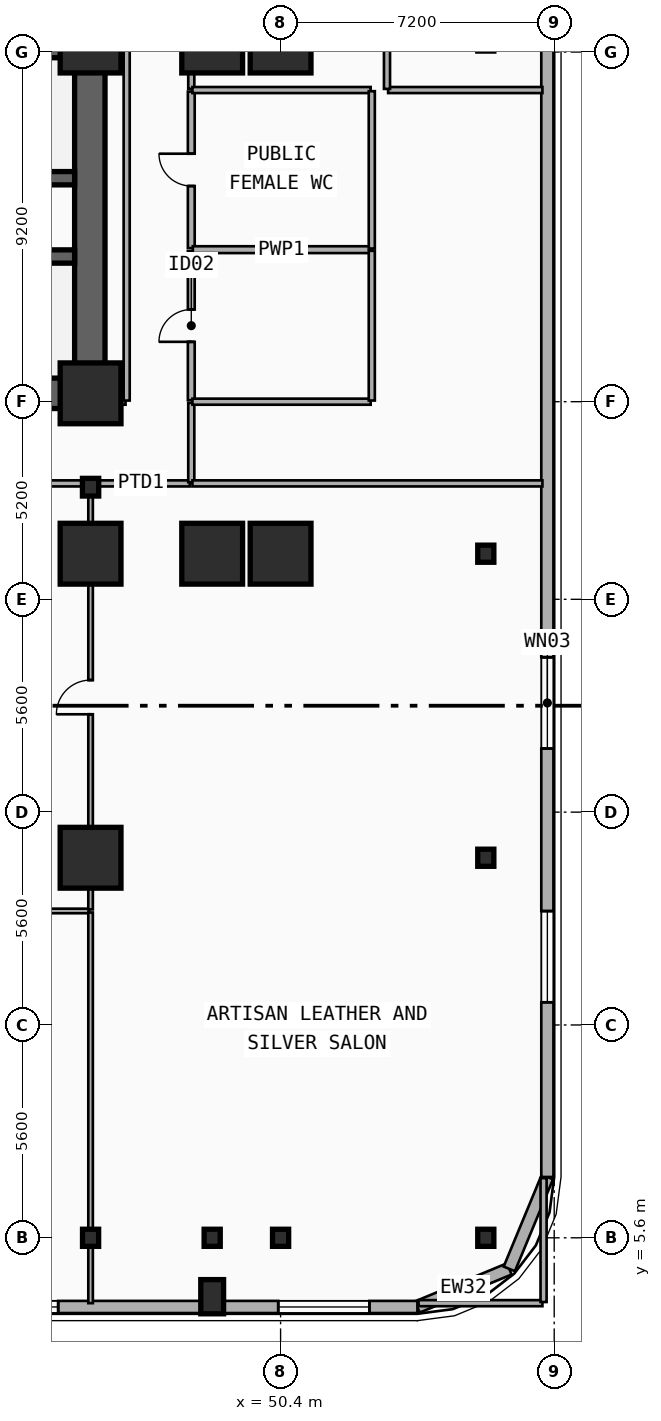
"""IFC4 building model, lengths in metres.
Left out: names, types, materials, properties, quantities, classifications, styles, units other than length and angle.
Written with IfcOpenShell. Run it as: python <this file> out.ifc"""

import sys

from ifc_helpers import new_model, si_unit, direction, frame, frame_2d, origin, origin_2d, place, context, subcontext, project, spatial, rectangle, i_section, extrude, element, fill, save


model = new_model("IFC4")
c1 = context("Model", 3, precision=1e-05, world=origin(), true_north=direction((0.0, 1.0)))
c2 = subcontext(c1, "Body", "Model", "MODEL_VIEW")
j1 = project(units=[si_unit("LENGTHUNIT", "METRE"), si_unit("PLANEANGLEUNIT", "RADIAN")], contexts=[c1])
p1 = place(None, origin())
s1 = spatial("IfcSite", under=j1, at=p1, CompositionType="ELEMENT")
p2 = place(p1, origin())
s2 = spatial("IfcBuilding", under=s1, at=p2, CompositionType="ELEMENT")
p3 = place(p2, frame((0.0, 0.0, 5.4)))
s3 = spatial("IfcBuildingStorey", under=s2, at=p3, CompositionType="ELEMENT", Elevation=5.4)
p4 = place(p3, frame((12.15, 37.05, 0.0), z_axis=(0.0, 0.0, 1.0), x_axis=(1.0, 0.0, 0.0)))
e1 = element("IfcWall", 1, at=p4, inside=s3, PredefinedType="SHEAR", context=c2, shape_type="SweptSolid", body=[
    extrude(rectangle(XDim=33.23, YDim=0.8, at=frame_2d((16.615, 0.0))), origin(), (0.0, 0.0, 1.0), 5.0),
])
p5 = place(p3, frame((45.38, 27.82, 0.0), z_axis=(0.0, 0.0, 1.0), x_axis=(-1.0, 0.0, 0.0)))
e2 = element("IfcWall", 2, at=p5, inside=s3, PredefinedType="SHEAR", context=c2, shape_type="SweptSolid", body=[
    extrude(rectangle(XDim=12.23, YDim=0.8, at=frame_2d((6.115, 0.0))), origin(), (0.0, 0.0, 1.0), 5.0),
])
p6 = place(p5, frame((9.93, 0.0, 0.0)))
e3 = element("IfcOpeningElement", 3, at=p6, cuts=e2, PredefinedType="OPENING", context=c2, shape_type="SweptSolid", body=[
    extrude(rectangle(XDim=1.1, YDim=2.15, at=frame_2d((0.55, 1.075))), frame((0.0, 0.41, 0.0), z_axis=(0.0, -1.0, 0.0), x_axis=(1.0, 0.0, 0.0)), (0.0, 0.0, 1.0), 0.82),
])
p7 = place(p5, frame((6.23, 0.0, 0.0)))
e4 = element("IfcOpeningElement", 4, at=p7, cuts=e2, PredefinedType="OPENING", context=c2, shape_type="SweptSolid", body=[
    extrude(rectangle(XDim=1.1, YDim=2.15, at=frame_2d((0.55, 1.075))), frame((0.0, 0.41, 0.0), z_axis=(0.0, -1.0, 0.0), x_axis=(1.0, 0.0, 0.0)), (0.0, 0.0, 1.0), 0.82),
])
p8 = place(p3, frame((45.38, 28.22, 0.0), z_axis=(0.0, 0.0, 1.0), x_axis=(0.0, 1.0, 0.0)))
e5 = element("IfcWall", 5, at=p8, inside=s3, PredefinedType="SHEAR", context=c2, shape_type="SweptSolid", body=[
    extrude(rectangle(XDim=8.43, YDim=0.8, at=frame_2d((4.215, 0.0))), origin(), (0.0, 0.0, 1.0), 5.0),
])
p9 = place(p3, frame((44.98, 33.48, 0.0), z_axis=(0.0, 0.0, 1.0), x_axis=(-1.0, 0.0, 0.0)))
e6 = element("IfcWall", 6, at=p9, inside=s3, PredefinedType="SHEAR", context=c2, shape_type="SweptSolid", body=[
    extrude(rectangle(XDim=8.425, YDim=0.35, at=frame_2d((4.212, 0.0))), origin(), (0.0, 0.0, 1.0), 5.0),
])
p10 = place(p9, frame((7.08, 0.0, 0.0)))
e7 = element("IfcOpeningElement", 7, at=p10, cuts=e6, PredefinedType="OPENING", context=c2, shape_type="SweptSolid", body=[
    extrude(rectangle(XDim=1.1, YDim=2.15, at=frame_2d((0.55, 1.075))), frame((0.0, 0.185, 0.0), z_axis=(0.0, -1.0, 0.0), x_axis=(1.0, 0.0, 0.0)), (0.0, 0.0, 1.0), 0.37),
])
p11 = place(p3, frame((36.555, 31.42, 0.0), z_axis=(0.0, 0.0, 1.0), x_axis=(1.0, 0.0, 0.0)))
e8 = element("IfcWall", 8, at=p11, inside=s3, PredefinedType="SHEAR", context=c2, shape_type="SweptSolid", body=[
    extrude(rectangle(XDim=8.425, YDim=0.35, at=frame_2d((4.212, 0.0))), origin(), (0.0, 0.0, 1.0), 5.0),
])
for number, where, z_axis, x_axis in (
    (9, (45.4, 27.82, 0.0), (0.0, 0.0, 1.0), (1.0, 0.0, 0.0)),
    (10, (45.4, 37.05, 0.0), (0.0, 0.0, 1.0), (1.0, 0.0, 0.0)),
):
    element("IfcColumn", number, at=place(p3, frame(where, z_axis=z_axis, x_axis=x_axis)), inside=s3, PredefinedType="COLUMN", context=c2, shape_type="SweptSolid", body=[
        extrude(rectangle(XDim=1.6, YDim=1.6, at=origin_2d()), origin(), (0.0, 0.0, 1.0), 5.0),
    ])
p12 = place(p3, frame((45.4, 25.35, 0.0), z_axis=(0.0, 0.0, 1.0), x_axis=(1.0, 0.0, 0.0)))
e11 = element("IfcColumn", 11, at=p12, inside=s3, PredefinedType="COLUMN", context=c2, shape_type="SweptSolid", body=[
    extrude(i_section(OverallWidth=0.428, OverallDepth=0.465, WebThickness=0.045, FlangeThickness=0.073, FilletRadius=0.015, at=origin_2d()), origin(), (0.0, 0.0, 1.0), 5.0),
])
p13 = place(p3, frame((45.4, 5.6, 0.0), z_axis=(0.0, 0.0, 1.0), x_axis=(1.0, 0.0, 0.0)))
e12 = element("IfcColumn", 12, at=p13, inside=s3, PredefinedType="COLUMN", context=c2, shape_type="SweptSolid", body=[
    extrude(i_section(OverallWidth=0.424, OverallDepth=0.45, WebThickness=0.041, FlangeThickness=0.065, FilletRadius=0.015, at=origin_2d()), origin(), (0.0, 0.0, 1.0), 5.0),
])
for number, where, z_axis, x_axis in (
    (13, (45.4, 15.6, 0.0), (0.0, 0.0, 1.0), (1.0, 0.0, 0.0)),
    (14, (45.4, 23.6, 0.0), (0.0, 0.0, 1.0), (1.0, 0.0, 0.0)),
):
    element("IfcColumn", number, at=place(p3, frame(where, z_axis=z_axis, x_axis=x_axis)), inside=s3, PredefinedType="COLUMN", context=c2, shape_type="SweptSolid", body=[
        extrude(rectangle(XDim=1.6, YDim=1.6, at=origin_2d()), origin(), (0.0, 0.0, 1.0), 5.0),
    ])
p14 = place(p3, frame((48.6, 5.6, 0.0), z_axis=(0.0, 0.0, 1.0), x_axis=(1.0, 0.0, 0.0)))
e15 = element("IfcColumn", 15, at=p14, inside=s3, PredefinedType="COLUMN", context=c2, shape_type="SweptSolid", body=[
    extrude(i_section(OverallWidth=0.424, OverallDepth=0.45, WebThickness=0.041, FlangeThickness=0.065, FilletRadius=0.015, at=origin_2d()), origin(), (0.0, 0.0, 1.0), 5.0),
])
for number, where, z_axis, x_axis in (
    (16, (48.6, 23.6, 0.0), (0.0, 0.0, 1.0), (1.0, 0.0, 0.0)),
    (17, (48.6, 37.05, 0.0), (0.0, 0.0, 1.0), (1.0, 0.0, 0.0)),
):
    element("IfcColumn", number, at=place(p3, frame(where, z_axis=z_axis, x_axis=x_axis)), inside=s3, PredefinedType="COLUMN", context=c2, shape_type="SweptSolid", body=[
        extrude(rectangle(XDim=1.6, YDim=1.6, at=origin_2d()), origin(), (0.0, 0.0, 1.0), 5.0),
    ])
p15 = place(p3, frame((50.4, 5.6, 0.0), z_axis=(0.0, 0.0, 1.0), x_axis=(1.0, 0.0, 0.0)))
e18 = element("IfcColumn", 18, at=p15, inside=s3, PredefinedType="COLUMN", context=c2, shape_type="SweptSolid", body=[
    extrude(i_section(OverallWidth=0.424, OverallDepth=0.45, WebThickness=0.041, FlangeThickness=0.065, FilletRadius=0.015, at=origin_2d()), origin(), (0.0, 0.0, 1.0), 5.0),
])
for number, where, z_axis, x_axis in (
    (19, (50.4, 23.6, 0.0), (0.0, 0.0, 1.0), (1.0, 0.0, 0.0)),
    (20, (50.4, 37.05, 0.0), (0.0, 0.0, 1.0), (1.0, 0.0, 0.0)),
):
    element("IfcColumn", number, at=place(p3, frame(where, z_axis=z_axis, x_axis=x_axis)), inside=s3, PredefinedType="COLUMN", context=c2, shape_type="SweptSolid", body=[
        extrude(rectangle(XDim=1.6, YDim=1.6, at=origin_2d()), origin(), (0.0, 0.0, 1.0), 5.0),
    ])
for number, where, z_axis, x_axis in (
    (21, (55.8, 5.6, 0.0), (0.0, 0.0, 1.0), (1.0, 0.0, 0.0)),
    (22, (55.8, 15.6, 0.0), (0.0, 0.0, 1.0), (1.0, 0.0, 0.0)),
    (23, (55.8, 23.6, 0.0), (0.0, 0.0, 1.0), (1.0, 0.0, 0.0)),
):
    element("IfcColumn", number, at=place(p3, frame(where, z_axis=z_axis, x_axis=x_axis)), inside=s3, PredefinedType="COLUMN", context=c2, shape_type="SweptSolid", body=[
        extrude(i_section(OverallWidth=0.424, OverallDepth=0.45, WebThickness=0.041, FlangeThickness=0.065, FilletRadius=0.015, at=origin_2d()), origin(), (0.0, 0.0, 1.0), 5.0),
    ])
p16 = place(p3, frame((48.6, 4.05, 0.0), z_axis=(0.0, 0.0, 1.0), x_axis=(1.0, 0.0, 0.0)))
e24 = element("IfcColumn", 24, at=p16, inside=s3, PredefinedType="PILASTER", context=c2, shape_type="SweptSolid", body=[
    extrude(rectangle(XDim=0.6, YDim=0.9, at=origin_2d()), origin(), (0.0, 0.0, 1.0), 5.0),
])
for number, where, z_axis, x_axis in (
    (25, (56.418, 4.782, 0.0), (0.0, 0.0, 1.0), (-0.924, -0.383, 0.0)),
    (26, (57.42, 7.2, 0.0), (0.0, 0.0, 1.0), (-0.383, -0.924, 0.0)),
):
    element("IfcWall", number, at=place(p3, frame(where, z_axis=z_axis, x_axis=x_axis)), inside=s3, PredefinedType="SOLIDWALL", context=c2, shape_type="SweptSolid", body=[
        extrude(rectangle(XDim=2.617, YDim=0.32, at=frame_2d((1.309, 0.0))), origin(), (0.0, 0.0, 1.0), 4.7),
    ])
p17 = place(p3, frame((57.42, 41.6, 0.0), z_axis=(0.0, 0.0, 1.0), x_axis=(0.0, -1.0, 0.0)))
e27 = element("IfcWall", 27, at=p17, inside=s3, PredefinedType="SOLIDWALL", context=c2, shape_type="SweptSolid", body=[
    extrude(rectangle(XDim=34.4, YDim=0.32, at=frame_2d((17.2, 0.0))), origin(), (0.0, 0.0, 1.0), 4.7),
])
p18 = place(p17, frame((20.727, 0.0, 0.9)))
e28 = element("IfcOpeningElement", 28, at=p18, cuts=e27, PredefinedType="OPENING", context=c2, shape_type="SweptSolid", body=[
    extrude(rectangle(XDim=2.4, YDim=1.8, at=frame_2d((1.2, 0.9))), frame((0.0, 0.17, 0.0), z_axis=(0.0, -1.0, 0.0), x_axis=(1.0, 0.0, 0.0)), (0.0, 0.0, 1.0), 0.34),
])
p19 = place(p17, frame((27.403, 0.0, 0.9)))
e29 = element("IfcOpeningElement", 29, at=p19, cuts=e27, PredefinedType="OPENING", context=c2, shape_type="SweptSolid", body=[
    extrude(rectangle(XDim=2.4, YDim=1.8, at=frame_2d((1.2, 0.9))), frame((0.0, 0.17, 0.0), z_axis=(0.0, -1.0, 0.0), x_axis=(1.0, 0.0, 0.0)), (0.0, 0.0, 1.0), 0.34),
])
p20 = place(p3, frame((54.0, 3.78, 0.0), z_axis=(0.0, 0.0, 1.0), x_axis=(-1.0, 0.0, 0.0)))
e30 = element("IfcWall", 30, at=p20, inside=s3, PredefinedType="SOLIDWALL", context=c2, shape_type="SweptSolid", body=[
    extrude(rectangle(XDim=16.95, YDim=0.32, at=frame_2d((8.475, 0.0))), origin(), (0.0, 0.0, 1.0), 4.03),
])
p21 = place(p20, frame((9.452, 0.0, 0.9)))
e31 = element("IfcOpeningElement", 31, at=p21, cuts=e30, PredefinedType="OPENING", context=c2, shape_type="SweptSolid", body=[
    extrude(rectangle(XDim=2.4, YDim=1.8, at=frame_2d((1.2, 0.9))), frame((0.0, 0.17, 0.0), z_axis=(0.0, -1.0, 0.0), x_axis=(1.0, 0.0, 0.0)), (0.0, 0.0, 1.0), 0.34),
])
p22 = place(p20, frame((1.262, 0.0, 0.9)))
e32 = element("IfcOpeningElement", 32, at=p22, cuts=e30, PredefinedType="OPENING", context=c2, shape_type="SweptSolid", body=[
    extrude(rectangle(XDim=2.4, YDim=1.8, at=frame_2d((1.2, 0.9))), frame((0.0, 0.17, 0.0), z_axis=(0.0, -1.0, 0.0), x_axis=(1.0, 0.0, 0.0)), (0.0, 0.0, 1.0), 0.34),
])
p23 = place(p3, frame((36.39, 25.45, 0.0), z_axis=(0.0, 0.0, 1.0), x_axis=(1.0, 0.0, 0.0)))
e33 = element("IfcWall", 33, at=p23, inside=s3, PredefinedType="PARTITIONING", context=c2, shape_type="SweptSolid", body=[
    extrude(rectangle(XDim=8.97, YDim=0.16, at=frame_2d((4.485, 0.0))), origin(), (0.0, 0.0, 1.0), 3.672),
])
p24 = place(p23, frame((3.985, 0.0, 0.0)))
e34 = element("IfcOpeningElement", 34, at=p24, cuts=e33, PredefinedType="OPENING", context=c2, shape_type="SweptSolid", body=[
    extrude(rectangle(XDim=1.0, YDim=2.15, at=frame_2d((0.5, 1.075))), frame((0.0, 0.09, 0.0), z_axis=(0.0, -1.0, 0.0), x_axis=(1.0, 0.0, 0.0)), (0.0, 0.0, 1.0), 0.18),
])
p25 = place(p3, frame((45.44, 25.45, 0.0), z_axis=(0.0, 0.0, 1.0), x_axis=(1.0, 0.0, 0.0)))
e35 = element("IfcWall", 35, at=p25, inside=s3, PredefinedType="PARTITIONING", context=c2, shape_type="SweptSolid", body=[
    extrude(rectangle(XDim=2.57, YDim=0.16, at=frame_2d((1.285, 0.0))), origin(), (0.0, 0.0, 1.0), 3.672),
])
p26 = place(p3, frame((48.05, 27.64, 0.0), z_axis=(0.0, 0.0, 1.0), x_axis=(0.0, 1.0, 0.0)))
e36 = element("IfcWall", 36, at=p26, inside=s3, PredefinedType="PLUMBINGWALL", context=c2, shape_type="SweptSolid", body=[
    extrude(rectangle(XDim=3.92, YDim=0.18, at=frame_2d((1.96, 0.0))), origin(), (0.0, 0.0, 1.0), 4.7),
])
p27 = place(p26, frame((1.535, 0.0, 0.0)))
e37 = element("IfcOpeningElement", 37, at=p27, cuts=e36, PredefinedType="OPENING", context=c2, shape_type="SweptSolid", body=[
    extrude(rectangle(XDim=0.85, YDim=2.1, at=frame_2d((0.425, 1.05))), frame((0.0, 0.1, 0.0), z_axis=(0.0, -1.0, 0.0), x_axis=(1.0, 0.0, 0.0)), (0.0, 0.0, 1.0), 0.2),
])
p28 = place(p3, frame((48.05, 31.64, 0.0), z_axis=(0.0, 0.0, 1.0), x_axis=(0.0, 1.0, 0.0)))
e38 = element("IfcWall", 38, at=p28, inside=s3, PredefinedType="PLUMBINGWALL", context=c2, shape_type="SweptSolid", body=[
    extrude(rectangle(XDim=4.12, YDim=0.18, at=frame_2d((2.06, 0.0))), origin(), (0.0, 0.0, 1.0), 4.7),
])
p29 = place(p28, frame((1.635, 0.0, 0.0)))
e39 = element("IfcOpeningElement", 39, at=p29, cuts=e38, PredefinedType="OPENING", context=c2, shape_type="SweptSolid", body=[
    extrude(rectangle(XDim=0.85, YDim=2.1, at=frame_2d((0.425, 1.05))), frame((0.0, 0.1, 0.0), z_axis=(0.0, -1.0, 0.0), x_axis=(1.0, 0.0, 0.0)), (0.0, 0.0, 1.0), 0.2),
])
p30 = place(p3, frame((48.09, 31.6, 0.0), z_axis=(0.0, 0.0, 1.0), x_axis=(1.0, 0.0, 0.0)))
e40 = element("IfcWall", 40, at=p30, inside=s3, PredefinedType="PLUMBINGWALL", context=c2, shape_type="SweptSolid", body=[
    extrude(rectangle(XDim=4.67, YDim=0.18, at=frame_2d((2.335, 0.0))), origin(), (0.0, 0.0, 1.0), 4.7),
])
p31 = place(p3, frame((36.39, 14.2, 0.0), z_axis=(0.0, 0.0, 1.0), x_axis=(1.0, 0.0, 0.0)))
e41 = element("IfcWall", 41, at=p31, inside=s3, PredefinedType="PARTITIONING", context=c2, shape_type="SweptSolid", body=[
    extrude(rectangle(XDim=8.97, YDim=0.12, at=frame_2d((4.485, 0.0))), origin(), (0.0, 0.0, 1.0), 3.672),
])
p32 = place(p31, frame((4.035, 0.0, 0.0)))
e42 = element("IfcOpeningElement", 42, at=p32, cuts=e41, PredefinedType="OPENING", context=c2, shape_type="SweptSolid", body=[
    extrude(rectangle(XDim=0.9, YDim=2.1, at=frame_2d((0.45, 1.05))), frame((0.0, 0.07, 0.0), z_axis=(0.0, -1.0, 0.0), x_axis=(1.0, 0.0, 0.0)), (0.0, 0.0, 1.0), 0.14),
])
p33 = place(p3, frame((45.4, 3.88, 0.0), z_axis=(0.0, 0.0, 1.0), x_axis=(0.0, 1.0, 0.0)))
e43 = element("IfcWall", 43, at=p33, inside=s3, PredefinedType="PARTITIONING", context=c2, shape_type="SweptSolid", body=[
    extrude(rectangle(XDim=10.28, YDim=0.12, at=frame_2d((5.14, 0.0))), origin(), (0.0, 0.0, 1.0), 3.672),
])
p34 = place(p3, frame((45.4, 14.24, 0.0), z_axis=(0.0, 0.0, 1.0), x_axis=(0.0, 1.0, 0.0)))
e44 = element("IfcWall", 44, at=p34, inside=s3, PredefinedType="PARTITIONING", context=c2, shape_type="SweptSolid", body=[
    extrude(rectangle(XDim=11.17, YDim=0.12, at=frame_2d((5.585, 0.0))), origin(), (0.0, 0.0, 1.0), 3.672),
])
p35 = place(p34, frame((5.135, 0.0, 0.0)))
e45 = element("IfcOpeningElement", 45, at=p35, cuts=e44, PredefinedType="OPENING", context=c2, shape_type="SweptSolid", body=[
    extrude(rectangle(XDim=0.9, YDim=2.1, at=frame_2d((0.45, 1.05))), frame((0.0, 0.07, 0.0), z_axis=(0.0, -1.0, 0.0), x_axis=(1.0, 0.0, 0.0)), (0.0, 0.0, 1.0), 0.14),
])
p36 = place(p3, frame((45.41, 27.6, 0.0), z_axis=(0.0, 0.0, 1.0), x_axis=(1.0, 0.0, 0.0)))
e46 = element("IfcWall", 46, at=p36, inside=s3, PredefinedType="PARTITIONING", context=c2, shape_type="SweptSolid", body=[
    extrude(rectangle(XDim=0.91, YDim=0.16, at=frame_2d((0.455, 0.0))), origin(), (0.0, 0.0, 1.0), 3.672),
])
p37 = place(p3, frame((48.05, 25.48, 0.0), z_axis=(0.0, 0.0, 1.0), x_axis=(0.0, 1.0, 0.0)))
e47 = element("IfcWall", 47, at=p37, inside=s3, PredefinedType="PARTITIONING", context=c2, shape_type="SweptSolid", body=[
    extrude(rectangle(XDim=2.09, YDim=0.16, at=frame_2d((1.045, 0.0))), origin(), (0.0, 0.0, 1.0), 4.7),
])
p38 = place(p3, frame((46.35, 27.63, 0.0), z_axis=(0.0, 0.0, 1.0), x_axis=(0.0, 1.0, 0.0)))
e48 = element("IfcWall", 48, at=p38, inside=s3, PredefinedType="PARTITIONING", context=c2, shape_type="SweptSolid", body=[
    extrude(rectangle(XDim=10.29, YDim=0.16, at=frame_2d((5.145, 0.0))), origin(), (0.0, 0.0, 1.0), 4.7),
])
p39 = place(p3, frame((48.05, 35.83, 0.0), z_axis=(0.0, 0.0, 1.0), x_axis=(0.0, 1.0, 0.0)))
e49 = element("IfcWall", 49, at=p39, inside=s3, PredefinedType="PARTITIONING", context=c2, shape_type="SweptSolid", body=[
    extrude(rectangle(XDim=2.09, YDim=0.16, at=frame_2d((1.045, 0.0))), origin(), (0.0, 0.0, 1.0), 4.7),
])
p40 = place(p3, frame((48.08, 27.6, 0.0), z_axis=(0.0, 0.0, 1.0), x_axis=(1.0, 0.0, 0.0)))
e50 = element("IfcWall", 50, at=p40, inside=s3, PredefinedType="PARTITIONING", context=c2, shape_type="SweptSolid", body=[
    extrude(rectangle(XDim=4.69, YDim=0.16, at=frame_2d((2.345, 0.0))), origin(), (0.0, 0.0, 1.0), 4.7),
])
p41 = place(p3, frame((52.8, 27.63, 0.0), z_axis=(0.0, 0.0, 1.0), x_axis=(0.0, 1.0, 0.0)))
e51 = element("IfcWall", 51, at=p41, inside=s3, PredefinedType="PARTITIONING", context=c2, shape_type="SweptSolid", body=[
    extrude(rectangle(XDim=3.94, YDim=0.16, at=frame_2d((1.97, 0.0))), origin(), (0.0, 0.0, 1.0), 4.7),
])
p42 = place(p3, frame((48.08, 35.8, 0.0), z_axis=(0.0, 0.0, 1.0), x_axis=(1.0, 0.0, 0.0)))
e52 = element("IfcWall", 52, at=p42, inside=s3, PredefinedType="PARTITIONING", context=c2, shape_type="SweptSolid", body=[
    extrude(rectangle(XDim=4.69, YDim=0.16, at=frame_2d((2.345, 0.0))), origin(), (0.0, 0.0, 1.0), 4.7),
])
p43 = place(p3, frame((52.8, 31.63, 0.0), z_axis=(0.0, 0.0, 1.0), x_axis=(0.0, 1.0, 0.0)))
e53 = element("IfcWall", 53, at=p43, inside=s3, PredefinedType="PARTITIONING", context=c2, shape_type="SweptSolid", body=[
    extrude(rectangle(XDim=4.14, YDim=0.16, at=frame_2d((2.07, 0.0))), origin(), (0.0, 0.0, 1.0), 4.7),
])
p44 = place(p3, frame((53.23, 35.8, 0.0), z_axis=(0.0, 0.0, 1.0), x_axis=(1.0, 0.0, 0.0)))
e54 = element("IfcWall", 54, at=p44, inside=s3, PredefinedType="PARTITIONING", context=c2, shape_type="SweptSolid", body=[
    extrude(rectangle(XDim=4.06, YDim=0.16, at=frame_2d((2.03, 0.0))), origin(), (0.0, 0.0, 1.0), 4.7),
])
p45 = place(p3, frame((53.2, 35.83, 0.0), z_axis=(0.0, 0.0, 1.0), x_axis=(0.0, 1.0, 0.0)))
e55 = element("IfcWall", 55, at=p45, inside=s3, PredefinedType="PARTITIONING", context=c2, shape_type="SweptSolid", body=[
    extrude(rectangle(XDim=2.09, YDim=0.16, at=frame_2d((1.045, 0.0))), origin(), (0.0, 0.0, 1.0), 4.7),
])
p46 = place(p3, frame((54.03, 3.88, 0.0), z_axis=(0.0, 0.0, 1.0), x_axis=(1.0, 0.0, 0.0)))
e56 = element("IfcWall", 56, at=p46, inside=s3, PredefinedType="PARTITIONING", context=c2, shape_type="SweptSolid", body=[
    extrude(rectangle(XDim=3.26, YDim=0.16, at=frame_2d((1.63, 0.0))), origin(), (0.0, 0.0, 1.0), 4.7),
])
p47 = place(p3, frame((48.08, 25.45, 0.0), z_axis=(0.0, 0.0, 1.0), x_axis=(1.0, 0.0, 0.0)))
e57 = element("IfcWall", 57, at=p47, inside=s3, PredefinedType="PARTITIONING", context=c2, shape_type="SweptSolid", body=[
    extrude(rectangle(XDim=9.21, YDim=0.16, at=frame_2d((4.605, 0.0))), origin(), (0.0, 0.0, 1.0), 4.7),
])
p48 = place(p3, frame((57.32, 3.91, 0.0), z_axis=(0.0, 0.0, 1.0), x_axis=(0.0, 1.0, 0.0)))
e58 = element("IfcWall", 58, at=p48, inside=s3, PredefinedType="PARTITIONING", context=c2, shape_type="SweptSolid", body=[
    extrude(rectangle(XDim=3.26, YDim=0.16, at=frame_2d((1.63, 0.0))), origin(), (0.0, 0.0, 1.0), 4.7),
])
p49 = place(p18, origin())
e59 = element("IfcWindow", 59, at=p49, inside=s3, PartitioningType="SINGLE_PANEL", PredefinedType="WINDOW", context=c2, shape_type="SweptSolid", body=[
    extrude(rectangle(XDim=2.4, YDim=1.8, at=frame_2d((1.2, 0.9))), frame((0.0, 0.03, 0.0), z_axis=(0.0, -1.0, 0.0), x_axis=(1.0, 0.0, 0.0)), (0.0, 0.0, 1.0), 0.06),
])
fill(e28, e59)
p50 = place(p19, origin())
e60 = element("IfcWindow", 60, at=p50, inside=s3, PartitioningType="SINGLE_PANEL", PredefinedType="WINDOW", context=c2, shape_type="SweptSolid", body=[
    extrude(rectangle(XDim=2.4, YDim=1.8, at=frame_2d((1.2, 0.9))), frame((0.0, 0.03, 0.0), z_axis=(0.0, -1.0, 0.0), x_axis=(1.0, 0.0, 0.0)), (0.0, 0.0, 1.0), 0.06),
])
fill(e29, e60)
p51 = place(p21, origin())
e61 = element("IfcWindow", 61, at=p51, inside=s3, PartitioningType="SINGLE_PANEL", PredefinedType="WINDOW", context=c2, shape_type="SweptSolid", body=[
    extrude(rectangle(XDim=2.4, YDim=1.8, at=frame_2d((1.2, 0.9))), frame((0.0, 0.03, 0.0), z_axis=(0.0, -1.0, 0.0), x_axis=(1.0, 0.0, 0.0)), (0.0, 0.0, 1.0), 0.06),
])
fill(e31, e61)
p52 = place(p22, origin())
e62 = element("IfcWindow", 62, at=p52, inside=s3, PartitioningType="SINGLE_PANEL", PredefinedType="WINDOW", context=c2, shape_type="SweptSolid", body=[
    extrude(rectangle(XDim=2.4, YDim=1.8, at=frame_2d((1.2, 0.9))), frame((0.0, 0.03, 0.0), z_axis=(0.0, -1.0, 0.0), x_axis=(1.0, 0.0, 0.0)), (0.0, 0.0, 1.0), 0.06),
])
fill(e32, e62)
p53 = place(p27, origin())
e63 = element("IfcDoor", 63, at=p53, inside=s3, OperationType="SINGLE_SWING_LEFT", PredefinedType="DOOR", context=c2, shape_type="SweptSolid", body=[
    extrude(rectangle(XDim=0.85, YDim=2.1, at=frame_2d((0.425, 1.05))), frame((0.0, 0.025, 0.0), z_axis=(0.0, -1.0, 0.0), x_axis=(1.0, 0.0, 0.0)), (0.0, 0.0, 1.0), 0.05),
])
fill(e37, e63)
p54 = place(p29, origin())
e64 = element("IfcDoor", 64, at=p54, inside=s3, OperationType="SINGLE_SWING_RIGHT", PredefinedType="DOOR", context=c2, shape_type="SweptSolid", body=[
    extrude(rectangle(XDim=0.85, YDim=2.1, at=frame_2d((0.425, 1.05))), frame((0.0, 0.025, 0.0), z_axis=(0.0, -1.0, 0.0), x_axis=(1.0, 0.0, 0.0)), (0.0, 0.0, 1.0), 0.05),
])
fill(e39, e64)
p55 = place(p35, origin())
e65 = element("IfcDoor", 65, at=p55, inside=s3, OperationType="SINGLE_SWING_LEFT", PredefinedType="DOOR", context=c2, shape_type="SweptSolid", body=[
    extrude(rectangle(XDim=0.9, YDim=2.1, at=frame_2d((0.45, 1.05))), frame((0.0, 0.025, 0.0), z_axis=(0.0, -1.0, 0.0), x_axis=(1.0, 0.0, 0.0)), (0.0, 0.0, 1.0), 0.05),
])
fill(e45, e65)
save(model, sys.argv[1])
